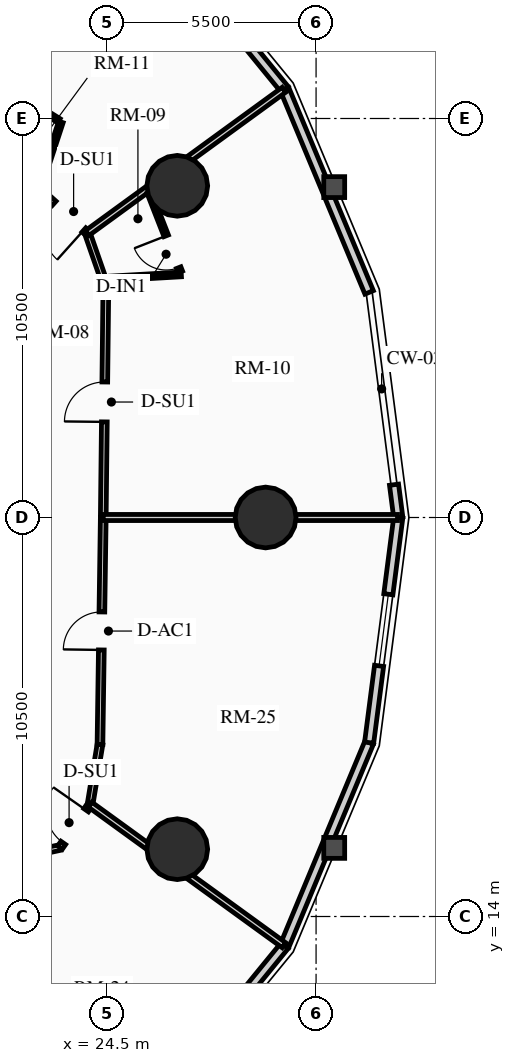
"""IFC4 building model, lengths in metres.
Left out: names, types, materials, properties, quantities, classifications, styles, units other than length and angle.
Written with IfcOpenShell. Run it as: python <this file> out.ifc"""

import sys

from ifc_helpers import new_model, si_unit, direction, frame, frame_2d, origin, origin_2d, place, context, subcontext, project, spatial, rectangle, circle, extrude, source, transform, mapped, element, fill, save


model = new_model("IFC4")
c1 = context("Model", 3, precision=1e-05, world=origin(), true_north=direction((0.0, 1.0)))
c2 = subcontext(c1, "Body", "Model", "MODEL_VIEW")
j1 = project(units=[si_unit("LENGTHUNIT", "METRE"), si_unit("PLANEANGLEUNIT", "RADIAN")], contexts=[c1])
p1 = place(None, origin())
s1 = spatial("IfcSite", under=j1, at=p1, CompositionType="ELEMENT")
p2 = place(p1, origin())
s2 = spatial("IfcBuilding", under=s1, at=p2, CompositionType="ELEMENT")
p3 = place(p2, frame((0.0, 0.0, 51.1)))
s3 = spatial("IfcBuildingStorey", under=s2, at=p3, CompositionType="ELEMENT", Elevation=51.1)
for number, where, z_axis, x_axis in (
    (1, (28.672, 24.5, 0.0), (0.0, 0.0, 1.0), (1.0, 0.0, 0.0)),
    (2, (26.347, 33.229, 0.0), (0.0, 0.0, 1.0), (1.0, 0.0, 0.0)),
    (3, (26.347, 15.771, 0.0), (0.0, 0.0, 1.0), (1.0, 0.0, 0.0)),
):
    element("IfcColumn", number, at=place(p3, frame(where, z_axis=z_axis, x_axis=x_axis)), inside=s3, PredefinedType="USERDEFINED", context=c2, shape_type="SweptSolid", body=[
        extrude(circle(Radius=0.8, at=origin_2d()), origin(), (0.0, 0.0, 1.0), 2.91),
    ])
p4 = place(p3, frame((32.051, 25.363, 0.0), z_axis=(0.0, 0.0, 1.0), x_axis=(0.128523364007, -0.991706481225, 0.0)))
e4 = element("IfcWall", 4, at=p4, inside=s3, PredefinedType="SOLIDWALL", context=c2, shape_type="SweptSolid", body=[
    extrude(rectangle(XDim=0.87, YDim=0.24, at=frame_2d((0.435, 0.0))), origin(), (0.0, 0.0, 1.0), 2.635),
])
p5 = place(p3, frame((29.172, 35.768, 0.0), z_axis=(0.0, 0.0, 1.0), x_axis=(0.384348836956, -0.923187939442, 0.0)))
e5 = element("IfcWall", 5, at=p5, inside=s3, PredefinedType="SOLIDWALL", context=c2, shape_type="SweptSolid", body=[
    extrude(rectangle(XDim=5.789, YDim=0.24, at=frame_2d((2.894, 0.0))), origin(), (0.0, 0.0, 1.0), 2.073),
])
p6 = place(p3, frame((25.707, 40.009, 0.0), z_axis=(0.0, 0.0, 1.0), x_axis=(0.632713287022, -0.77438614168, 0.0)))
e6 = element("IfcWall", 6, at=p6, inside=s3, PredefinedType="SOLIDWALL", context=c2, shape_type="SweptSolid", body=[
    extrude(rectangle(XDim=5.477, YDim=0.24, at=frame_2d((2.738, 0.0))), origin(), (0.0, 0.0, 1.0), 2.073),
])
m1 = source(origin(), c2, "Body", "SweptSolid", [
    extrude(rectangle(XDim=1.9, YDim=1.35, at=frame_2d((0.95, 0.675))), frame((0.0, 0.13, 0.0), z_axis=(0.0, -1.0, 0.0), x_axis=(1.0, 0.0, 0.0)), (0.0, 0.0, 1.0), 0.26),
])
p7 = place(p6, frame((1.788, 0.0, 0.65)))
e7 = element("IfcOpeningElement", 7, at=p7, cuts=e6, PredefinedType="OPENING", context=c2, shape_type="MappedRepresentation", body=[
    mapped(m1, transform((0.0, 0.0, 0.0), x_axis=(1.0, 0.0, 0.0), y_axis=(0.0, 1.0, 0.0), z_axis=(0.0, 0.0, 1.0), scale=1.0)),
])
p8 = place(p3, frame((29.172, 13.232, 0.0), z_axis=(0.0, 0.0, 1.0), x_axis=(-0.632713287022, -0.77438614168, 0.0)))
e8 = element("IfcWall", 8, at=p8, inside=s3, PredefinedType="SOLIDWALL", context=c2, shape_type="SweptSolid", body=[
    extrude(rectangle(XDim=5.477, YDim=0.24, at=frame_2d((2.738, 0.0))), origin(), (0.0, 0.0, 1.0), 2.073),
])
p9 = place(p8, frame((1.788, 0.0, 0.65)))
e9 = element("IfcOpeningElement", 9, at=p9, cuts=e8, PredefinedType="OPENING", context=c2, shape_type="MappedRepresentation", body=[
    mapped(m1, transform((0.0, 0.0, 0.0), x_axis=(1.0, 0.0, 0.0), y_axis=(0.0, 1.0, 0.0), z_axis=(0.0, 0.0, 1.0), scale=1.0)),
])
p10 = place(p3, frame((31.396, 18.576, 0.0), z_axis=(0.0, 0.0, 1.0), x_axis=(-0.384348836956, -0.923187939442, 0.0)))
e10 = element("IfcWall", 10, at=p10, inside=s3, PredefinedType="SOLIDWALL", context=c2, shape_type="SweptSolid", body=[
    extrude(rectangle(XDim=5.789, YDim=0.24, at=frame_2d((2.894, 0.0))), origin(), (0.0, 0.0, 1.0), 2.073),
])
p11 = place(p3, frame((32.163, 24.5, 0.0), z_axis=(0.0, 0.0, 1.0), x_axis=(-0.128339641463, -0.991730274031, 0.0)))
e11 = element("IfcWall", 11, at=p11, inside=s3, PredefinedType="SOLIDWALL", context=c2, shape_type="SweptSolid", body=[
    extrude(rectangle(XDim=5.973, YDim=0.24, at=frame_2d((2.987, 0.0))), origin(), (0.0, 0.0, 1.0), 2.073),
])
p12 = place(p11, frame((2.037, 0.0, 0.65)))
e12 = element("IfcOpeningElement", 12, at=p12, cuts=e11, PredefinedType="OPENING", context=c2, shape_type="MappedRepresentation", body=[
    mapped(m1, transform((0.0, 0.0, 0.0), x_axis=(1.0, 0.0, 0.0), y_axis=(0.0, 1.0, 0.0), z_axis=(0.0, 0.0, 1.0), scale=1.0)),
])
p13 = place(p3, frame((24.4, 24.5, 0.0), z_axis=(0.0, 0.0, 1.0), x_axis=(0.011359710161, 0.999935476411, 0.0)))
e13 = element("IfcWall", 13, at=p13, inside=s3, PredefinedType="PARTITIONING", context=c2, shape_type="SweptSolid", body=[
    extrude(rectangle(XDim=6.082, YDim=0.15, at=frame_2d((3.041, 0.0))), origin(), (0.0, 0.0, 1.0), 2.159),
])
m2 = source(origin(), c2, "Body", "SweptSolid", [
    extrude(rectangle(XDim=1.05, YDim=2.015, at=frame_2d((0.525, 1.007))), frame((0.0, 0.085, 0.0), z_axis=(0.0, -1.0, 0.0), x_axis=(1.0, 0.0, 0.0)), (0.0, 0.0, 1.0), 0.17),
])
p14 = place(p13, frame((2.516, 0.0, 0.0)))
e14 = element("IfcOpeningElement", 14, at=p14, cuts=e13, PredefinedType="OPENING", context=c2, shape_type="MappedRepresentation", body=[
    mapped(m2, transform((0.0, 0.0, 0.0), x_axis=(1.0, 0.0, 0.0), y_axis=(0.0, 1.0, 0.0), z_axis=(0.0, 0.0, 1.0), scale=1.0)),
])
p15 = place(p3, frame((24.469, 30.582, 0.0), z_axis=(0.0, 0.0, 1.0), x_axis=(-0.328902536986, 0.944363871166, 0.0)))
e15 = element("IfcWall", 15, at=p15, inside=s3, PredefinedType="PARTITIONING", context=c2, shape_type="SweptSolid", body=[
    extrude(rectangle(XDim=1.488, YDim=0.15, at=frame_2d((0.744, 0.0))), origin(), (0.0, 0.0, 1.0), 2.205),
])
p16 = place(p3, frame((23.98, 31.987, 0.0), z_axis=(0.0, 0.0, 1.0), x_axis=(-0.744317922268, 0.667825449193, 0.0)))
e16 = element("IfcWall", 16, at=p16, inside=s3, PredefinedType="PARTITIONING", context=c2, shape_type="SweptSolid", body=[
    extrude(rectangle(XDim=1.481, YDim=0.15, at=frame_2d((0.74, 0.0))), origin(), (0.0, 0.0, 1.0), 2.159),
])
p17 = place(p16, frame((0.12, 0.0, 0.0)))
e17 = element("IfcOpeningElement", 17, at=p17, cuts=e16, PredefinedType="OPENING", context=c2, shape_type="MappedRepresentation", body=[
    mapped(m2, transform((0.0, 0.0, 0.0), x_axis=(1.0, 0.0, 0.0), y_axis=(0.0, 1.0, 0.0), z_axis=(0.0, 0.0, 1.0), scale=1.0)),
])
p18 = place(p3, frame((21.419, 15.418, 0.0), z_axis=(0.0, 0.0, 1.0), x_axis=(0.977540384091, 0.210748184977, 0.0)))
e18 = element("IfcWall", 18, at=p18, inside=s3, PredefinedType="PARTITIONING", context=c2, shape_type="SweptSolid", body=[
    extrude(rectangle(XDim=1.887, YDim=0.15, at=frame_2d((0.944, 0.0))), origin(), (0.0, 0.0, 1.0), 2.205),
])
p19 = place(p3, frame((23.263, 15.816, 0.0), z_axis=(0.0, 0.0, 1.0), x_axis=(0.572652947117, 0.819797903241, 0.0)))
e19 = element("IfcWall", 19, at=p19, inside=s3, PredefinedType="PARTITIONING", context=c2, shape_type="SweptSolid", body=[
    extrude(rectangle(XDim=1.377, YDim=0.15, at=frame_2d((0.688, 0.0))), origin(), (0.0, 0.0, 1.0), 2.159),
])
p20 = place(p19, frame((0.147, 0.0, 0.0)))
e20 = element("IfcOpeningElement", 20, at=p20, cuts=e19, PredefinedType="OPENING", context=c2, shape_type="MappedRepresentation", body=[
    mapped(m2, transform((0.0, 0.0, 0.0), x_axis=(1.0, 0.0, 0.0), y_axis=(0.0, 1.0, 0.0), z_axis=(0.0, 0.0, 1.0), scale=1.0)),
])
p21 = place(p3, frame((24.052, 16.945, 0.0), z_axis=(0.0, 0.0, 1.0), x_axis=(0.162869842843, 0.986647563364, 0.0)))
e21 = element("IfcWall", 21, at=p21, inside=s3, PredefinedType="PARTITIONING", context=c2, shape_type="SweptSolid", body=[
    extrude(rectangle(XDim=1.605, YDim=0.15, at=frame_2d((0.803, 0.0))), origin(), (0.0, 0.0, 1.0), 2.205),
])
p22 = place(p3, frame((24.313, 18.529, 0.0), z_axis=(0.0, 0.0, 1.0), x_axis=(0.014472275982, 0.99989527113, 0.0)))
e22 = element("IfcWall", 22, at=p22, inside=s3, PredefinedType="PARTITIONING", context=c2, shape_type="SweptSolid", body=[
    extrude(rectangle(XDim=5.972, YDim=0.15, at=frame_2d((2.986, 0.0))), origin(), (0.0, 0.0, 1.0), 2.635),
])
m3 = source(origin(), c2, "Body", "SweptSolid", [
    extrude(rectangle(XDim=1.0, YDim=2.015, at=frame_2d((0.5, 1.007))), frame((0.0, 0.085, 0.0), z_axis=(0.0, -1.0, 0.0), x_axis=(1.0, 0.0, 0.0)), (0.0, 0.0, 1.0), 0.17),
])
p23 = place(p22, frame((2.486, 0.0, 0.0)))
e23 = element("IfcOpeningElement", 23, at=p23, cuts=e22, PredefinedType="OPENING", context=c2, shape_type="MappedRepresentation", body=[
    mapped(m3, transform((0.0, 0.0, 0.0), x_axis=(1.0, 0.0, 0.0), y_axis=(0.0, 1.0, 0.0), z_axis=(0.0, 0.0, 1.0), scale=1.0)),
])
p24 = place(p3, frame((24.4, 24.5, 0.0), z_axis=(0.0, 0.0, 1.0), x_axis=(1.0, 0.0, 0.0)))
e24 = element("IfcWall", 24, at=p24, inside=s3, PredefinedType="PARTITIONING", context=c2, shape_type="SweptSolid", body=[
    extrude(rectangle(XDim=7.743, YDim=0.16, at=frame_2d((3.872, 0.0))), origin(), (0.0, 0.0, 1.0), 2.073),
])
p25 = place(p3, frame((23.98, 31.987, 0.0), z_axis=(0.0, 0.0, 1.0), x_axis=(0.80834018144, 0.588715679313, 0.0)))
e25 = element("IfcWall", 25, at=p25, inside=s3, PredefinedType="PARTITIONING", context=c2, shape_type="SweptSolid", body=[
    extrude(rectangle(XDim=6.403, YDim=0.16, at=frame_2d((3.202, 0.0))), origin(), (0.0, 0.0, 1.0), 2.073),
])
p26 = place(p3, frame((24.052, 16.945, 0.0), z_axis=(0.0, 0.0, 1.0), x_axis=(0.809544185493, -0.587058950817, 0.0)))
e26 = element("IfcWall", 26, at=p26, inside=s3, PredefinedType="PARTITIONING", context=c2, shape_type="SweptSolid", body=[
    extrude(rectangle(XDim=6.304, YDim=0.16, at=frame_2d((3.152, 0.0))), origin(), (0.0, 0.0, 1.0), 2.073),
])
p27 = place(p3, frame((24.601, 30.79, 0.0), z_axis=(0.0, 0.0, 1.0), x_axis=(0.998323904123, 0.057873849514, 0.0)))
e27 = element("IfcWall", 27, at=p27, inside=s3, PredefinedType="PARTITIONING", context=c2, shape_type="SweptSolid", body=[
    extrude(rectangle(XDim=1.856, YDim=0.125, at=frame_2d((0.928, 0.0))), origin(), (0.0, 0.0, 1.0), 2.205),
])
p28 = place(p3, frame((26.428, 30.963, 0.0), z_axis=(0.0, 0.0, 1.0), x_axis=(-0.364149471566, 0.931340519014, 0.0)))
e28 = element("IfcWall", 28, at=p28, inside=s3, PredefinedType="PARTITIONING", context=c2, shape_type="SweptSolid", body=[
    extrude(rectangle(XDim=2.247, YDim=0.125, at=frame_2d((1.124, 0.0))), origin(), (0.0, 0.0, 1.0), 2.159),
])
m4 = source(origin(), c2, "Body", "SweptSolid", [
    extrude(rectangle(XDim=0.9, YDim=2.005, at=frame_2d((0.45, 1.002))), frame((0.0, 0.073, 0.0), z_axis=(0.0, -1.0, 0.0), x_axis=(1.0, 0.0, 0.0)), (0.0, 0.0, 1.0), 0.145),
])
p29 = place(p28, frame((0.12, 0.0, 0.0)))
e29 = element("IfcOpeningElement", 29, at=p29, cuts=e28, PredefinedType="OPENING", context=c2, shape_type="MappedRepresentation", body=[
    mapped(m4, transform((0.0, 0.0, 0.0), x_axis=(1.0, 0.0, 0.0), y_axis=(0.0, 1.0, 0.0), z_axis=(0.0, 0.0, 1.0), scale=1.0)),
])
p30 = place(p3, frame((22.76, 33.313, 0.0), z_axis=(0.0, 0.0, 1.0), x_axis=(0.312649886595, 0.949868437423, 0.0)))
e30 = element("IfcWall", 30, at=p30, inside=s3, PredefinedType="PARTITIONING", context=c2, shape_type="SweptSolid", body=[
    extrude(rectangle(XDim=1.68, YDim=0.125, at=frame_2d((0.84, 0.0))), origin(), (0.0, 0.0, 1.0), 2.205),
])
p31 = place(p3, frame((23.233, 34.941, 0.0), z_axis=(0.0, 0.0, 1.0), x_axis=(-0.84760373009, 0.53062973601, 0.0)))
e31 = element("IfcWall", 31, at=p31, inside=s3, PredefinedType="PARTITIONING", context=c2, shape_type="SweptSolid", body=[
    extrude(rectangle(XDim=1.983, YDim=0.125, at=frame_2d((0.991, 0.0))), origin(), (0.0, 0.0, 1.0), 2.635),
])
p32 = place(p31, frame((0.436, 0.0, 0.0)))
e32 = element("IfcOpeningElement", 32, at=p32, cuts=e31, PredefinedType="OPENING", context=c2, shape_type="MappedRepresentation", body=[
    mapped(m4, transform((0.0, 0.0, 0.0), x_axis=(1.0, 0.0, 0.0), y_axis=(0.0, 1.0, 0.0), z_axis=(0.0, 0.0, 1.0), scale=1.0)),
])
m5 = source(origin(), c2, "Body", "SweptSolid", [
    extrude(rectangle(XDim=1.9, YDim=1.35, at=frame_2d((0.95, 0.675))), frame((0.0, 0.03, 0.0), z_axis=(0.0, -1.0, 0.0), x_axis=(1.0, 0.0, 0.0)), (0.0, 0.0, 1.0), 0.06),
])
p33 = place(p12, origin())
e33 = element("IfcWindow", 33, at=p33, inside=s3, PartitioningType="DOUBLE_PANEL_VERTICAL", PredefinedType="WINDOW", context=c2, shape_type="MappedRepresentation", body=[
    mapped(m5, transform((0.0, 0.0, 0.0), x_axis=(1.0, 0.0, 0.0), y_axis=(0.0, 1.0, 0.0), z_axis=(0.0, 0.0, 1.0), scale=1.0)),
])
fill(e12, e33)
m6 = source(origin(), c2, "Body", "SweptSolid", [
    extrude(rectangle(XDim=1.05, YDim=2.015, at=frame_2d((0.525, 1.007))), frame((0.0, 0.025, 0.0), z_axis=(0.0, -1.0, 0.0), x_axis=(1.0, 0.0, 0.0)), (0.0, 0.0, 1.0), 0.05),
])
p34 = place(p14, origin())
e34 = element("IfcDoor", 34, at=p34, inside=s3, OperationType="SINGLE_SWING_LEFT", PredefinedType="DOOR", context=c2, shape_type="MappedRepresentation", body=[
    mapped(m6, transform((0.0, 0.0, 0.0), x_axis=(1.0, 0.0, 0.0), y_axis=(0.0, 1.0, 0.0), z_axis=(0.0, 0.0, 1.0), scale=1.0)),
])
fill(e14, e34)
m7 = source(origin(), c2, "Body", "SweptSolid", [
    extrude(rectangle(XDim=0.9, YDim=2.005, at=frame_2d((0.45, 1.002))), frame((0.0, 0.025, 0.0), z_axis=(0.0, -1.0, 0.0), x_axis=(1.0, 0.0, 0.0)), (0.0, 0.0, 1.0), 0.05),
])
p35 = place(p29, origin())
e35 = element("IfcDoor", 35, at=p35, inside=s3, OperationType="SINGLE_SWING_RIGHT", PredefinedType="DOOR", context=c2, shape_type="MappedRepresentation", body=[
    mapped(m7, transform((0.0, 0.0, 0.0), x_axis=(1.0, 0.0, 0.0), y_axis=(0.0, 1.0, 0.0), z_axis=(0.0, 0.0, 1.0), scale=1.0)),
])
fill(e29, e35)
p36 = place(p17, origin())
e36 = element("IfcDoor", 36, at=p36, inside=s3, OperationType="SINGLE_SWING_LEFT", PredefinedType="DOOR", context=c2, shape_type="MappedRepresentation", body=[
    mapped(m6, transform((0.0, 0.0, 0.0), x_axis=(1.0, 0.0, 0.0), y_axis=(0.0, 1.0, 0.0), z_axis=(0.0, 0.0, 1.0), scale=1.0)),
])
fill(e17, e36)
p37 = place(p20, origin())
e37 = element("IfcDoor", 37, at=p37, inside=s3, OperationType="SINGLE_SWING_RIGHT", PredefinedType="DOOR", context=c2, shape_type="MappedRepresentation", body=[
    mapped(m6, transform((0.0, 0.0, 0.0), x_axis=(1.0, 0.0, 0.0), y_axis=(0.0, 1.0, 0.0), z_axis=(0.0, 0.0, 1.0), scale=1.0)),
])
fill(e20, e37)
m8 = source(origin(), c2, "Body", "SweptSolid", [
    extrude(rectangle(XDim=1.0, YDim=2.015, at=frame_2d((0.5, 1.007))), frame((0.0, 0.025, 0.0), z_axis=(0.0, -1.0, 0.0), x_axis=(1.0, 0.0, 0.0)), (0.0, 0.0, 1.0), 0.05),
])
p38 = place(p23, origin())
e38 = element("IfcDoor", 38, at=p38, inside=s3, OperationType="SINGLE_SWING_LEFT", PredefinedType="DOOR", context=c2, shape_type="MappedRepresentation", body=[
    mapped(m8, transform((0.0, 0.0, 0.0), x_axis=(1.0, 0.0, 0.0), y_axis=(0.0, 1.0, 0.0), z_axis=(0.0, 0.0, 1.0), scale=1.0)),
])
fill(e23, e38)
save(model, sys.argv[1])
